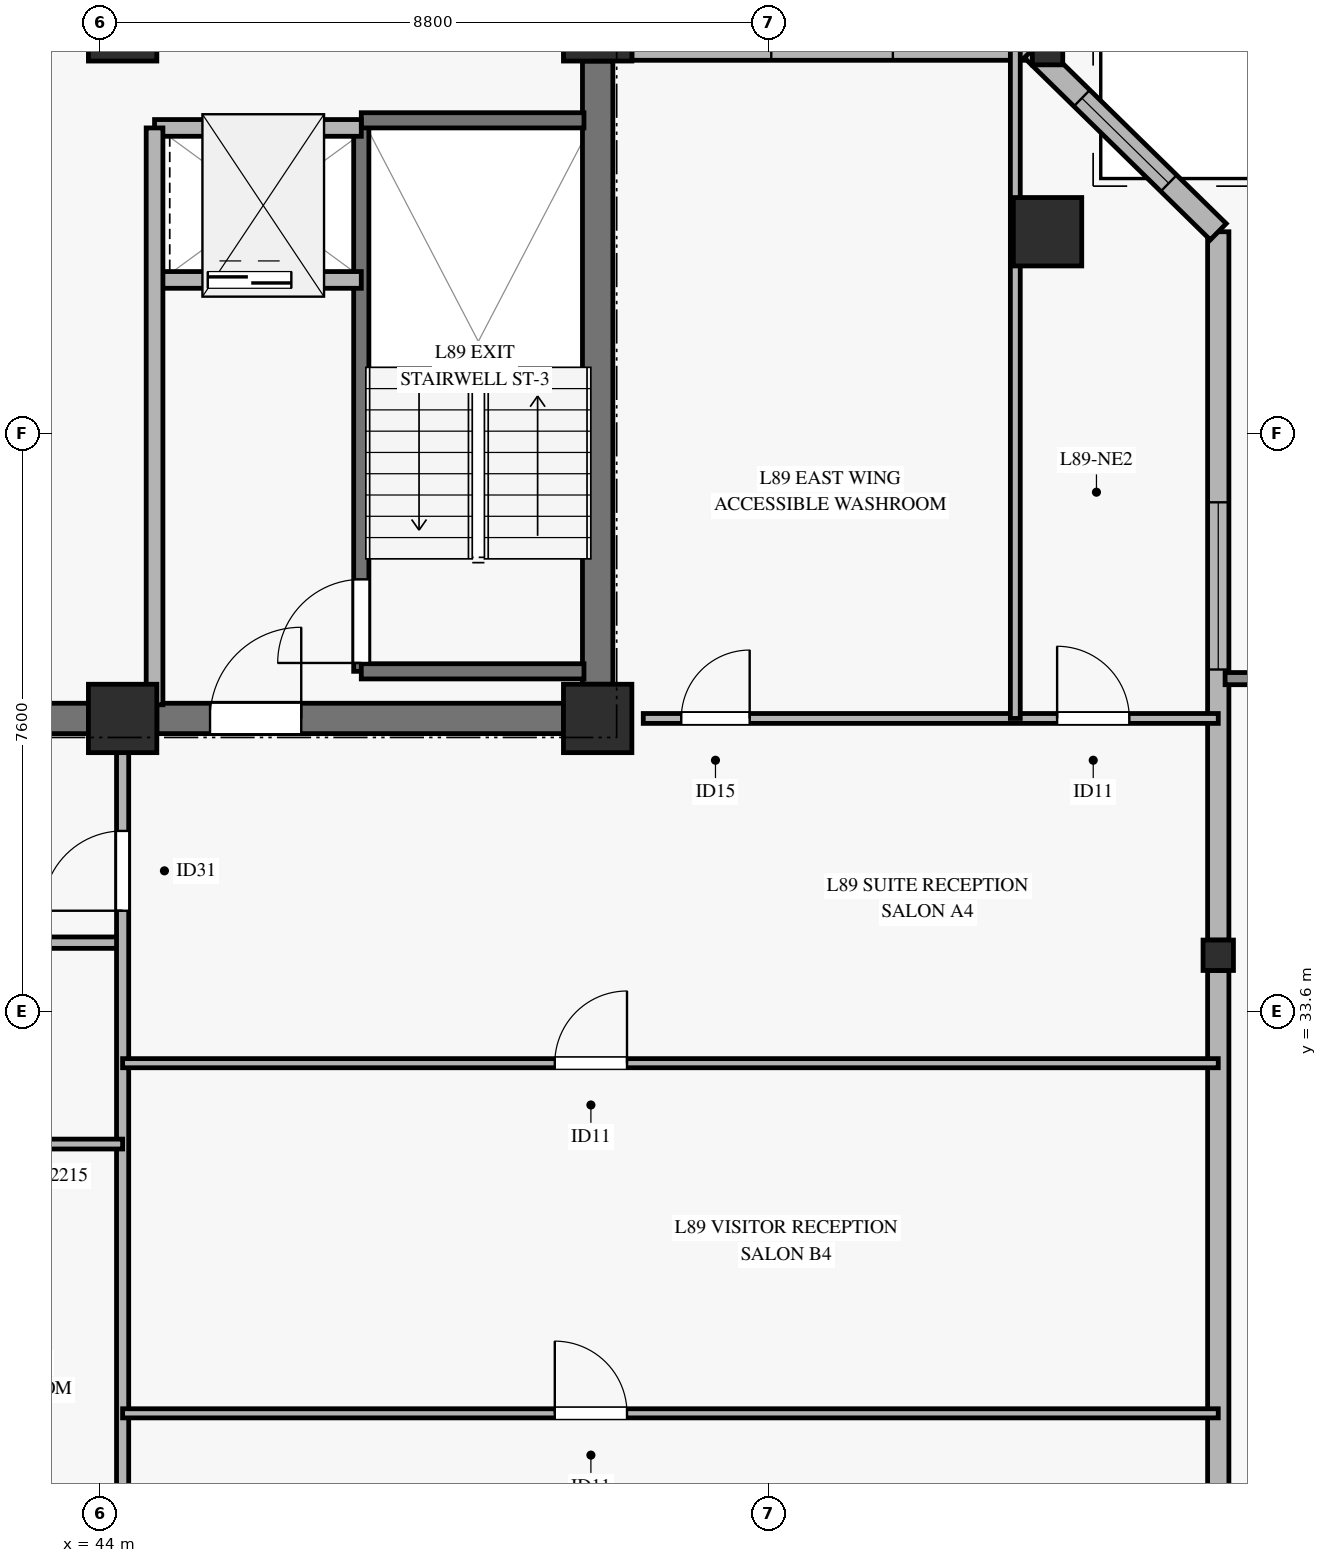
"""IFC4 building model, lengths in metres.
Left out: names, types, materials, properties, quantities, classifications, styles, units other than length and angle.
Written with IfcOpenShell. Run it as: python <this file> out.ifc"""

import sys

from ifc_helpers import new_model, si_unit, direction, frame, frame_2d, origin, origin_2d, place, context, subcontext, project, spatial, rectangle, hollow_rectangle, extrude, source, transform, mapped, element, fill, save


model = new_model("IFC4")
c1 = context("Model", 3, precision=1e-05, world=origin(), true_north=direction((0.0, 1.0)))
c2 = subcontext(c1, "Body", "Model", "MODEL_VIEW")
j1 = project(units=[si_unit("LENGTHUNIT", "METRE"), si_unit("PLANEANGLEUNIT", "RADIAN")], contexts=[c1])
p1 = place(None, origin())
s1 = spatial("IfcSite", under=j1, at=p1, CompositionType="ELEMENT")
p2 = place(p1, origin())
s2 = spatial("IfcBuilding", under=s1, at=p2, CompositionType="ELEMENT")
p3 = place(p2, frame((0.0, 0.0, 342.5)))
s3 = spatial("IfcBuildingStorey", under=s2, at=p3, CompositionType="ELEMENT", Elevation=342.5)
m1 = source(origin(), c2, "Body", "SweptSolid", [
    extrude(rectangle(XDim=0.9, YDim=0.9, at=origin_2d()), origin(), (0.0, 0.0, 1.0), 3.185),
])
for number, where, z_axis, x_axis in (
    (1, (44.3, 37.45, 0.0), (0.0, 0.0, 1.0), (1.0, 0.0, 0.0)),
    (2, (44.3, 46.55, 0.0), (0.0, 0.0, 1.0), (1.0, 0.0, 0.0)),
    (3, (50.55, 37.45, 0.0), (0.0, 0.0, 1.0), (1.0, 0.0, 0.0)),
    (4, (50.55, 46.55, 0.0), (0.0, 0.0, 1.0), (1.0, 0.0, 0.0)),
):
    element("IfcColumn", number, at=place(p3, frame(where, z_axis=z_axis, x_axis=x_axis)), inside=s3, PredefinedType="PILASTER", context=c2, shape_type="MappedRepresentation", body=[
        mapped(m1, transform((0.0, 0.0, 0.0), x_axis=(1.0, 0.0, 0.0), y_axis=(0.0, 1.0, 0.0), z_axis=(0.0, 0.0, 1.0), scale=1.0)),
    ])
p4 = place(p3, frame((36.05, 37.45, 0.0), z_axis=(0.0, 0.0, 1.0), x_axis=(1.0, 0.0, 0.0)))
e5 = element("IfcWall", 5, at=p4, inside=s3, PredefinedType="SHEAR", context=c2, shape_type="SweptSolid", body=[
    extrude(rectangle(XDim=7.8, YDim=0.4, at=frame_2d((3.9, 0.0))), origin(), (0.0, 0.0, 1.0), 3.185),
])
p5 = place(p3, frame((44.75, 37.45, 0.0), z_axis=(0.0, 0.0, 1.0), x_axis=(1.0, 0.0, 0.0)))
e6 = element("IfcWall", 6, at=p5, inside=s3, PredefinedType="SHEAR", context=c2, shape_type="SweptSolid", body=[
    extrude(rectangle(XDim=5.35, YDim=0.4, at=frame_2d((2.675, 0.0))), origin(), (0.0, 0.0, 1.0), 3.185),
])
p6 = place(p5, frame((0.7, 0.0, 0.0)))
e7 = element("IfcOpeningElement", 7, at=p6, cuts=e6, PredefinedType="OPENING", context=c2, shape_type="SweptSolid", body=[
    extrude(rectangle(XDim=1.2, YDim=2.15, at=frame_2d((0.6, 1.075))), frame((0.0, 0.21, 0.0), z_axis=(0.0, -1.0, 0.0), x_axis=(1.0, 0.0, 0.0)), (0.0, 0.0, 1.0), 0.42),
])
p7 = place(p3, frame((50.55, 37.9, 0.0), z_axis=(0.0, 0.0, 1.0), x_axis=(0.0, 1.0, 0.0)))
e8 = element("IfcWall", 8, at=p7, inside=s3, PredefinedType="SHEAR", context=c2, shape_type="SweptSolid", body=[
    extrude(rectangle(XDim=8.2, YDim=0.4, at=frame_2d((4.1, 0.0))), origin(), (0.0, 0.0, 1.0), 3.185),
])
m2 = source(origin(), c2, "Body", "SweptSolid", [
    extrude(hollow_rectangle(XDim=0.9, YDim=0.9, WallThickness=0.04, at=origin_2d()), origin(), (0.0, 0.0, 1.0), 3.207),
])
p8 = place(p3, frame((56.469, 43.854, 0.0), z_axis=(-0.115040045039, 0.01431338747, 0.993257728375), x_axis=(-0.1234688995, -0.99234844226, 0.0)))
e9 = element("IfcColumn", 9, at=p8, inside=s3, PredefinedType="COLUMN", context=c2, shape_type="MappedRepresentation", body=[
    mapped(m2, transform((0.0, 0.0, 0.0), x_axis=(1.0, 0.0, 0.0), y_axis=(0.0, 1.0, 0.0), z_axis=(0.0, 0.0, 1.0), scale=1.0)),
])
m3 = source(origin(), c2, "Body", "SweptSolid", [
    extrude(hollow_rectangle(XDim=0.4, YDim=0.4, WallThickness=0.02, at=origin_2d()), origin(), (0.0, 0.0, 1.0), 3.246),
])
p9 = place(p3, frame((58.715, 34.334, 0.0), z_axis=(-0.127876528395, 0.143597819239, 0.981339523201), x_axis=(-0.746804669772, -0.665043446104, 0.0)))
e10 = element("IfcColumn", 10, at=p9, inside=s3, PredefinedType="COLUMN", context=c2, shape_type="MappedRepresentation", body=[
    mapped(m3, transform((0.0, 0.0, 0.0), x_axis=(1.0, 0.0, 0.0), y_axis=(0.0, 1.0, 0.0), z_axis=(0.0, 0.0, 1.0), scale=1.0)),
])
m4 = source(origin(), c2, "Body", "SweptSolid", [
    extrude(hollow_rectangle(XDim=0.4, YDim=0.4, WallThickness=0.02, at=origin_2d()), origin(), (0.0, 0.0, 1.0), 3.206),
])
p10 = place(p3, frame((56.469, 46.25, 0.0), z_axis=(-0.115051831153, 0.0, 0.993359489887), x_axis=(0.0, -1.0, 0.0)))
e11 = element("IfcColumn", 11, at=p10, inside=s3, PredefinedType="COLUMN", context=c2, shape_type="MappedRepresentation", body=[
    mapped(m4, transform((0.0, 0.0, 0.0), x_axis=(1.0, 0.0, 0.0), y_axis=(0.0, 1.0, 0.0), z_axis=(0.0, 0.0, 1.0), scale=1.0)),
])
p11 = place(p3, frame((58.715, 24.814, 0.0), z_axis=(0.0, 0.0, 1.0), x_axis=(0.0, 1.0, 0.0)))
e12 = element("IfcWall", 12, at=p11, inside=s3, PredefinedType="SOLIDWALL", context=c2, shape_type="SweptSolid", body=[
    extrude(rectangle(XDim=9.32, YDim=0.28, at=frame_2d((4.66, 0.0))), origin(), (0.0, 0.0, 1.0), 2.815),
])
p12 = place(p3, frame((58.715, 34.534, 0.0), z_axis=(0.0, 0.0, 1.0), x_axis=(0.0, 1.0, 0.0)))
e13 = element("IfcWall", 13, at=p12, inside=s3, PredefinedType="SOLIDWALL", context=c2, shape_type="SweptSolid", body=[
    extrude(rectangle(XDim=9.32, YDim=0.28, at=frame_2d((4.66, 0.0))), origin(), (0.0, 0.0, 1.0), 2.815),
])
p13 = place(p12, frame((3.56, 0.0, 0.45)))
e14 = element("IfcOpeningElement", 14, at=p13, cuts=e13, PredefinedType="OPENING", context=c2, shape_type="SweptSolid", body=[
    extrude(rectangle(XDim=2.2, YDim=2.1, at=frame_2d((1.1, 1.05))), frame((0.0, 0.15, 0.0), z_axis=(0.0, -1.0, 0.0), x_axis=(1.0, 0.0, 0.0)), (0.0, 0.0, 1.0), 0.3),
])
p14 = place(p3, frame((51.0, 46.25, 0.0), z_axis=(0.0, 0.0, 1.0), x_axis=(1.0, 0.0, 0.0)))
e15 = element("IfcWall", 15, at=p14, inside=s3, PredefinedType="SOLIDWALL", context=c2, shape_type="SweptSolid", body=[
    extrude(rectangle(XDim=5.269, YDim=0.28, at=frame_2d((2.635, 0.0))), origin(), (0.0, 0.0, 1.0), 2.815),
])
p15 = place(p14, frame((1.834, 0.0, 0.45)))
e16 = element("IfcOpeningElement", 16, at=p15, cuts=e15, PredefinedType="OPENING", context=c2, shape_type="SweptSolid", body=[
    extrude(rectangle(XDim=1.6, YDim=2.0, at=frame_2d((0.8, 1.0))), frame((0.0, 0.15, 0.0), z_axis=(0.0, -1.0, 0.0), x_axis=(1.0, 0.0, 0.0)), (0.0, 0.0, 1.0), 0.3),
])
p16 = place(p3, frame((58.715, 43.854, 0.0), z_axis=(0.0, 0.0, 1.0), x_axis=(-0.714377494024, 0.699760527632, 0.0)))
e17 = element("IfcWall", 17, at=p16, inside=s3, PredefinedType="SOLIDWALL", context=c2, shape_type="SweptSolid", body=[
    extrude(rectangle(XDim=3.424, YDim=0.3, at=frame_2d((1.712, 0.0))), origin(), (0.0, 0.0, 1.0), 2.815),
])
p17 = place(p16, frame((0.912, 0.0, 0.45)))
e18 = element("IfcOpeningElement", 18, at=p17, cuts=e17, PredefinedType="OPENING", context=c2, shape_type="SweptSolid", body=[
    extrude(rectangle(XDim=1.6, YDim=2.0, at=frame_2d((0.8, 1.0))), frame((0.0, 0.16, 0.0), z_axis=(0.0, -1.0, 0.0), x_axis=(1.0, 0.0, 0.0)), (0.0, 0.0, 1.0), 0.32),
])
p18 = place(p3, frame((47.44, 38.07, 0.0), z_axis=(0.0, 0.0, 1.0), x_axis=(0.0, 1.0, 0.0)))
e19 = element("IfcWall", 19, at=p18, inside=s3, PredefinedType="SOLIDWALL", context=c2, shape_type="SweptSolid", body=[
    extrude(rectangle(XDim=7.25, YDim=0.2, at=frame_2d((3.625, 0.0))), origin(), (0.0, 0.0, 1.0), 3.4),
])
p19 = place(p18, frame((0.11, 0.0, 0.0)))
e20 = element("IfcOpeningElement", 20, at=p19, cuts=e19, PredefinedType="OPENING", context=c2, shape_type="SweptSolid", body=[
    extrude(rectangle(XDim=1.1, YDim=2.15, at=frame_2d((0.55, 1.075))), frame((0.0, 0.11, 0.0), z_axis=(0.0, -1.0, 0.0), x_axis=(1.0, 0.0, 0.0)), (0.0, 0.0, 1.0), 0.22),
])
for number, where, z_axis, x_axis in (
    (21, (47.44, 45.32, 0.0), (0.0, 0.0, 1.0), (1.0, 0.0, 0.0)),
    (22, (47.44, 38.07, 0.0), (0.0, 0.0, 1.0), (1.0, 0.0, 0.0)),
):
    element("IfcWall", number, at=place(p3, frame(where, z_axis=z_axis, x_axis=x_axis)), inside=s3, PredefinedType="SOLIDWALL", context=c2, shape_type="SweptSolid", body=[
        extrude(rectangle(XDim=2.93, YDim=0.2, at=frame_2d((1.465, 0.0))), origin(), (0.0, 0.0, 1.0), 3.4),
    ])
p20 = place(p3, frame((44.72, 43.22, 0.0), z_axis=(0.0, 0.0, 1.0), x_axis=(1.0, 0.0, 0.0)))
e23 = element("IfcWall", 23, at=p20, inside=s3, PredefinedType="SOLIDWALL", context=c2, shape_type="SweptSolid", body=[
    extrude(rectangle(XDim=2.72, YDim=0.22, at=frame_2d((1.36, 0.0))), origin(), (0.0, 0.0, 1.0), 3.185),
])
p21 = place(p20, frame((0.7, 0.0, 0.0)))
e24 = element("IfcOpeningElement", 24, at=p21, cuts=e23, PredefinedType="OPENING", context=c2, shape_type="SweptSolid", body=[
    extrude(rectangle(XDim=1.1, YDim=2.2, at=frame_2d((0.55, 1.1))), frame((0.0, 0.12, 0.0), z_axis=(0.0, -1.0, 0.0), x_axis=(1.0, 0.0, 0.0)), (0.0, 0.0, 1.0), 0.24),
])
p22 = place(p3, frame((44.72, 45.22, 0.0), z_axis=(0.0, 0.0, 1.0), x_axis=(1.0, 0.0, 0.0)))
e25 = element("IfcWall", 25, at=p22, inside=s3, PredefinedType="SOLIDWALL", context=c2, shape_type="SweptSolid", body=[
    extrude(rectangle(XDim=2.72, YDim=0.22, at=frame_2d((1.36, 0.0))), origin(), (0.0, 0.0, 1.0), 3.185),
])
p23 = place(p3, frame((44.72, 37.63, 0.0), z_axis=(0.0, 0.0, 1.0), x_axis=(0.0, 1.0, 0.0)))
e26 = element("IfcWall", 26, at=p23, inside=s3, PredefinedType="SOLIDWALL", context=c2, shape_type="SweptSolid", body=[
    extrude(rectangle(XDim=7.59, YDim=0.22, at=frame_2d((3.795, 0.0))), origin(), (0.0, 0.0, 1.0), 3.185),
])
p24 = place(p3, frame((23.5, 34.5, 0.0), z_axis=(0.0, 0.0, 1.0), x_axis=(1.0, 0.0, 0.0)))
e27 = element("IfcWall", 27, at=p24, inside=s3, PredefinedType="PARTITIONING", context=c2, shape_type="SweptSolid", body=[
    extrude(rectangle(XDim=20.8, YDim=0.15, at=frame_2d((10.4, 0.0))), origin(), (0.0, 0.0, 1.0), 2.47),
])
p25 = place(p24, frame((4.767, 0.0, 0.0)))
e28 = element("IfcOpeningElement", 28, at=p25, cuts=e27, PredefinedType="OPENING", context=c2, shape_type="SweptSolid", body=[
    extrude(rectangle(XDim=1.05, YDim=2.15, at=frame_2d((0.525, 1.075))), frame((0.0, 0.085, 0.0), z_axis=(0.0, -1.0, 0.0), x_axis=(1.0, 0.0, 0.0)), (0.0, 0.0, 1.0), 0.17),
])
p26 = place(p24, frame((16.025, 0.0, 0.0)))
e29 = element("IfcOpeningElement", 29, at=p26, cuts=e27, PredefinedType="OPENING", context=c2, shape_type="SweptSolid", body=[
    extrude(rectangle(XDim=1.05, YDim=2.15, at=frame_2d((0.525, 1.075))), frame((0.0, 0.085, 0.0), z_axis=(0.0, -1.0, 0.0), x_axis=(1.0, 0.0, 0.0)), (0.0, 0.0, 1.0), 0.17),
])
p27 = place(p3, frame((44.3, 22.568, 0.0), z_axis=(0.0, 0.0, 1.0), x_axis=(0.0, 1.0, 0.0)))
e30 = element("IfcWall", 30, at=p27, inside=s3, PredefinedType="PARTITIONING", context=c2, shape_type="SweptSolid", body=[
    extrude(rectangle(XDim=14.882, YDim=0.16, at=frame_2d((7.441, 0.0))), origin(), (0.0, 0.0, 1.0), 2.47),
])
p28 = place(p27, frame((12.352, 0.0, 0.0)))
e31 = element("IfcOpeningElement", 31, at=p28, cuts=e30, PredefinedType="OPENING", context=c2, shape_type="SweptSolid", body=[
    extrude(rectangle(XDim=1.05, YDim=2.15, at=frame_2d((0.525, 1.075))), frame((0.0, 0.09, 0.0), z_axis=(0.0, -1.0, 0.0), x_axis=(1.0, 0.0, 0.0)), (0.0, 0.0, 1.0), 0.18),
])
p29 = place(p3, frame((42.085, 31.85, 0.0), z_axis=(0.0, 0.0, 1.0), x_axis=(1.0, 0.0, 0.0)))
e32 = element("IfcWall", 32, at=p29, inside=s3, PredefinedType="PARTITIONING", context=c2, shape_type="SweptSolid", body=[
    extrude(rectangle(XDim=2.215, YDim=0.13, at=frame_2d((1.107, 0.0))), origin(), (0.0, 0.0, 1.0), 2.47),
])
p30 = place(p3, frame((44.3, 28.307, 0.0), z_axis=(0.0, 0.0, 1.0), x_axis=(1.0, 0.0, 0.0)))
e33 = element("IfcWall", 33, at=p30, inside=s3, PredefinedType="PARTITIONING", context=c2, shape_type="SweptSolid", body=[
    extrude(rectangle(XDim=14.415, YDim=0.12, at=frame_2d((7.208, 0.0))), origin(), (0.0, 0.0, 1.0), 2.47),
])
p31 = place(p30, frame((5.686, 0.0, 0.0)))
e34 = element("IfcOpeningElement", 34, at=p31, cuts=e33, PredefinedType="OPENING", context=c2, shape_type="SweptSolid", body=[
    extrude(rectangle(XDim=0.95, YDim=2.1, at=frame_2d((0.475, 1.05))), frame((0.0, 0.07, 0.0), z_axis=(0.0, -1.0, 0.0), x_axis=(1.0, 0.0, 0.0)), (0.0, 0.0, 1.0), 0.14),
])
p32 = place(p3, frame((44.3, 32.914, 0.0), z_axis=(0.0, 0.0, 1.0), x_axis=(1.0, 0.0, 0.0)))
e35 = element("IfcWall", 35, at=p32, inside=s3, PredefinedType="PARTITIONING", context=c2, shape_type="SweptSolid", body=[
    extrude(rectangle(XDim=14.415, YDim=0.12, at=frame_2d((7.208, 0.0))), origin(), (0.0, 0.0, 1.0), 2.47),
])
p33 = place(p32, frame((5.686, 0.0, 0.0)))
e36 = element("IfcOpeningElement", 36, at=p33, cuts=e35, PredefinedType="OPENING", context=c2, shape_type="SweptSolid", body=[
    extrude(rectangle(XDim=0.95, YDim=2.1, at=frame_2d((0.475, 1.05))), frame((0.0, 0.07, 0.0), z_axis=(0.0, -1.0, 0.0), x_axis=(1.0, 0.0, 0.0)), (0.0, 0.0, 1.0), 0.14),
])
p34 = place(p3, frame((51.15, 37.45, 0.0), z_axis=(0.0, 0.0, 1.0), x_axis=(1.0, 0.0, 0.0)))
e37 = element("IfcWall", 37, at=p34, inside=s3, PredefinedType="PARTITIONING", context=c2, shape_type="SweptSolid", body=[
    extrude(rectangle(XDim=7.565, YDim=0.13, at=frame_2d((3.783, 0.0))), origin(), (0.0, 0.0, 1.0), 2.82),
])
p35 = place(p34, frame((0.5, 0.0, 0.0)))
e38 = element("IfcOpeningElement", 38, at=p35, cuts=e37, PredefinedType="OPENING", context=c2, shape_type="SweptSolid", body=[
    extrude(rectangle(XDim=0.9, YDim=2.1, at=frame_2d((0.45, 1.05))), frame((0.0, 0.075, 0.0), z_axis=(0.0, -1.0, 0.0), x_axis=(1.0, 0.0, 0.0)), (0.0, 0.0, 1.0), 0.15),
])
p36 = place(p34, frame((5.445, 0.0, 0.0)))
e39 = element("IfcOpeningElement", 39, at=p36, cuts=e37, PredefinedType="OPENING", context=c2, shape_type="SweptSolid", body=[
    extrude(rectangle(XDim=0.95, YDim=2.1, at=frame_2d((0.475, 1.05))), frame((0.0, 0.075, 0.0), z_axis=(0.0, -1.0, 0.0), x_axis=(1.0, 0.0, 0.0)), (0.0, 0.0, 1.0), 0.15),
])
p37 = place(p3, frame((56.045, 37.45, 0.0), z_axis=(0.0, 0.0, 1.0), x_axis=(0.0, 1.0, 0.0)))
e40 = element("IfcWall", 40, at=p37, inside=s3, PredefinedType="PARTITIONING", context=c2, shape_type="SweptSolid", body=[
    extrude(rectangle(XDim=8.8, YDim=0.13, at=frame_2d((4.4, 0.0))), origin(), (0.0, 0.0, 1.0), 2.82),
])
m5 = source(origin(), c2, "Body", "SweptSolid", [
    extrude(rectangle(XDim=2.2, YDim=2.1, at=frame_2d((1.1, 1.05))), frame((0.0, 0.03, 0.0), z_axis=(0.0, -1.0, 0.0), x_axis=(1.0, 0.0, 0.0)), (0.0, 0.0, 1.0), 0.06),
])
p38 = place(p13, origin())
e41 = element("IfcWindow", 41, at=p38, inside=s3, PartitioningType="SINGLE_PANEL", PredefinedType="WINDOW", context=c2, shape_type="MappedRepresentation", body=[
    mapped(m5, transform((0.0, 0.0, 0.0), x_axis=(1.0, 0.0, 0.0), y_axis=(0.0, 1.0, 0.0), z_axis=(0.0, 0.0, 1.0), scale=1.0)),
])
fill(e14, e41)
m6 = source(origin(), c2, "Body", "SweptSolid", [
    extrude(rectangle(XDim=1.6, YDim=2.0, at=frame_2d((0.8, 1.0))), frame((0.0, 0.03, 0.0), z_axis=(0.0, -1.0, 0.0), x_axis=(1.0, 0.0, 0.0)), (0.0, 0.0, 1.0), 0.06),
])
p39 = place(p17, origin())
e42 = element("IfcWindow", 42, at=p39, inside=s3, PartitioningType="SINGLE_PANEL", PredefinedType="WINDOW", context=c2, shape_type="MappedRepresentation", body=[
    mapped(m6, transform((0.0, 0.0, 0.0), x_axis=(1.0, 0.0, 0.0), y_axis=(0.0, 1.0, 0.0), z_axis=(0.0, 0.0, 1.0), scale=1.0)),
])
fill(e18, e42)
m7 = source(origin(), c2, "Body", "SweptSolid", [
    extrude(rectangle(XDim=1.1, YDim=2.15, at=frame_2d((0.55, 1.075))), frame((0.0, 0.025, 0.0), z_axis=(0.0, -1.0, 0.0), x_axis=(1.0, 0.0, 0.0)), (0.0, 0.0, 1.0), 0.05),
])
p40 = place(p19, origin())
e43 = element("IfcDoor", 43, at=p40, inside=s3, OperationType="SINGLE_SWING_LEFT", PredefinedType="DOOR", context=c2, shape_type="MappedRepresentation", body=[
    mapped(m7, transform((0.0, 0.0, 0.0), x_axis=(1.0, 0.0, 0.0), y_axis=(0.0, 1.0, 0.0), z_axis=(0.0, 0.0, 1.0), scale=1.0)),
])
fill(e20, e43)
m8 = source(origin(), c2, "Body", "SweptSolid", [
    extrude(rectangle(XDim=1.1, YDim=2.2, at=frame_2d((0.55, 1.1))), frame((0.0, 0.025, 0.0), z_axis=(0.0, -1.0, 0.0), x_axis=(1.0, 0.0, 0.0)), (0.0, 0.0, 1.0), 0.05),
])
p41 = place(p21, origin())
e44 = element("IfcDoor", 44, at=p41, inside=s3, OperationType="SLIDING_TO_LEFT", PredefinedType="DOOR", context=c2, shape_type="MappedRepresentation", body=[
    mapped(m8, transform((0.0, 0.0, 0.0), x_axis=(1.0, 0.0, 0.0), y_axis=(0.0, 1.0, 0.0), z_axis=(0.0, 0.0, 1.0), scale=1.0)),
])
fill(e24, e44)
m9 = source(origin(), c2, "Body", "SweptSolid", [
    extrude(rectangle(XDim=1.2, YDim=2.15, at=frame_2d((0.6, 1.075))), frame((0.0, 0.025, 0.0), z_axis=(0.0, -1.0, 0.0), x_axis=(1.0, 0.0, 0.0)), (0.0, 0.0, 1.0), 0.05),
])
p42 = place(p6, origin())
e45 = element("IfcDoor", 45, at=p42, inside=s3, OperationType="SINGLE_SWING_RIGHT", PredefinedType="DOOR", context=c2, shape_type="MappedRepresentation", body=[
    mapped(m9, transform((0.0, 0.0, 0.0), x_axis=(1.0, 0.0, 0.0), y_axis=(0.0, 1.0, 0.0), z_axis=(0.0, 0.0, 1.0), scale=1.0)),
])
fill(e7, e45)
m10 = source(origin(), c2, "Body", "SweptSolid", [
    extrude(rectangle(XDim=1.05, YDim=2.15, at=frame_2d((0.525, 1.075))), frame((0.0, 0.025, 0.0), z_axis=(0.0, -1.0, 0.0), x_axis=(1.0, 0.0, 0.0)), (0.0, 0.0, 1.0), 0.05),
])
p43 = place(p28, origin())
e46 = element("IfcDoor", 46, at=p43, inside=s3, OperationType="SINGLE_SWING_LEFT", PredefinedType="DOOR", context=c2, shape_type="MappedRepresentation", body=[
    mapped(m10, transform((0.0, 0.0, 0.0), x_axis=(1.0, 0.0, 0.0), y_axis=(0.0, 1.0, 0.0), z_axis=(0.0, 0.0, 1.0), scale=1.0)),
])
fill(e31, e46)
m11 = source(origin(), c2, "Body", "SweptSolid", [
    extrude(rectangle(XDim=0.95, YDim=2.1, at=frame_2d((0.475, 1.05))), frame((0.0, 0.025, 0.0), z_axis=(0.0, -1.0, 0.0), x_axis=(1.0, 0.0, 0.0)), (0.0, 0.0, 1.0), 0.05),
])
p44 = place(p33, origin())
e47 = element("IfcDoor", 47, at=p44, inside=s3, OperationType="SINGLE_SWING_RIGHT", PredefinedType="DOOR", context=c2, shape_type="MappedRepresentation", body=[
    mapped(m11, transform((0.0, 0.0, 0.0), x_axis=(1.0, 0.0, 0.0), y_axis=(0.0, 1.0, 0.0), z_axis=(0.0, 0.0, 1.0), scale=1.0)),
])
fill(e36, e47)
p45 = place(p31, origin())
e48 = element("IfcDoor", 48, at=p45, inside=s3, OperationType="SINGLE_SWING_LEFT", PredefinedType="DOOR", context=c2, shape_type="MappedRepresentation", body=[
    mapped(m11, transform((0.0, 0.0, 0.0), x_axis=(1.0, 0.0, 0.0), y_axis=(0.0, 1.0, 0.0), z_axis=(0.0, 0.0, 1.0), scale=1.0)),
])
fill(e34, e48)
m12 = source(origin(), c2, "Body", "SweptSolid", [
    extrude(rectangle(XDim=0.9, YDim=2.1, at=frame_2d((0.45, 1.05))), frame((0.0, 0.025, 0.0), z_axis=(0.0, -1.0, 0.0), x_axis=(1.0, 0.0, 0.0)), (0.0, 0.0, 1.0), 0.05),
])
p46 = place(p35, origin())
e49 = element("IfcDoor", 49, at=p46, inside=s3, OperationType="SINGLE_SWING_RIGHT", PredefinedType="DOOR", context=c2, shape_type="MappedRepresentation", body=[
    mapped(m12, transform((0.0, 0.0, 0.0), x_axis=(1.0, 0.0, 0.0), y_axis=(0.0, 1.0, 0.0), z_axis=(0.0, 0.0, 1.0), scale=1.0)),
])
fill(e38, e49)
p47 = place(p36, origin())
e50 = element("IfcDoor", 50, at=p47, inside=s3, OperationType="SINGLE_SWING_LEFT", PredefinedType="DOOR", context=c2, shape_type="MappedRepresentation", body=[
    mapped(m11, transform((0.0, 0.0, 0.0), x_axis=(1.0, 0.0, 0.0), y_axis=(0.0, 1.0, 0.0), z_axis=(0.0, 0.0, 1.0), scale=1.0)),
])
fill(e39, e50)
save(model, sys.argv[1])
